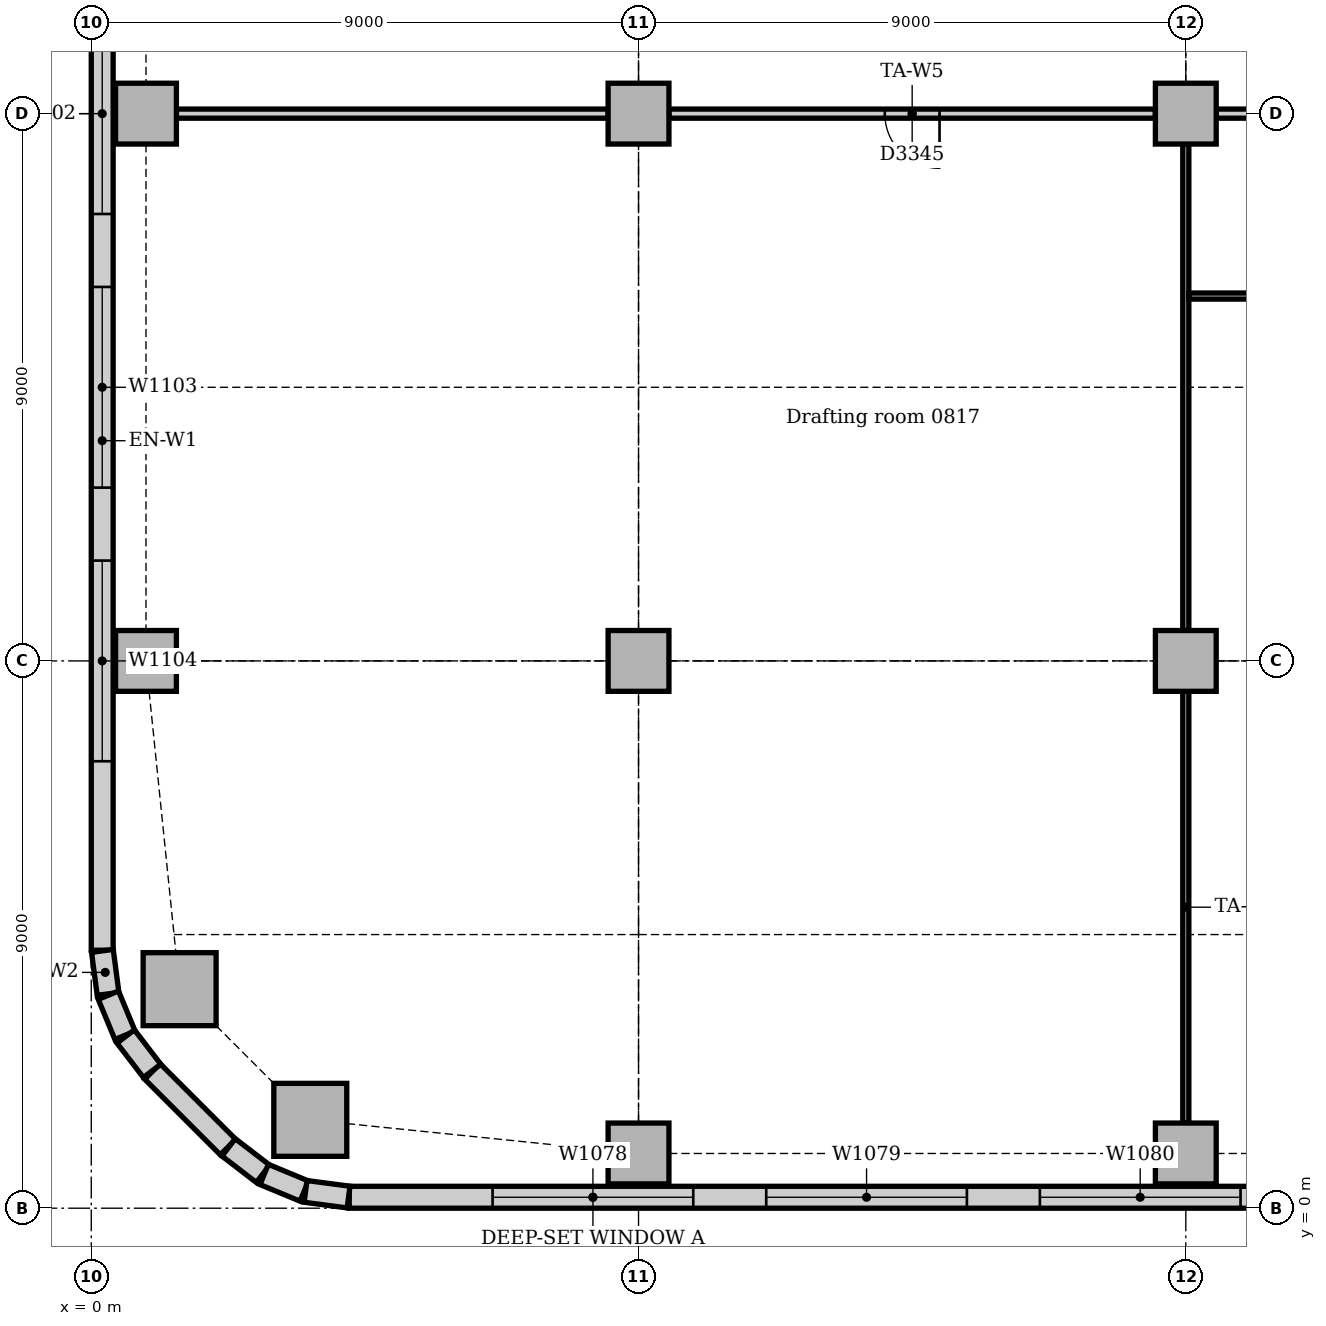
"""IFC4 building model, lengths in metres.
Left out: names, types, materials, properties, quantities, classifications, styles, units other than length and angle.
Written with IfcOpenShell. Run it as: python <this file> out.ifc"""

import sys

from ifc_helpers import new_model, si_unit, direction, frame, frame_2d, origin, origin_2d, place, context, subcontext, project, spatial, rectangle, extrude, element, fill, save


model = new_model("IFC4")
c1 = context("Model", 3, precision=1e-05, world=origin(), true_north=direction((0.0, 1.0)))
c2 = subcontext(c1, "Body", "Model", "MODEL_VIEW")
j1 = project(units=[si_unit("LENGTHUNIT", "METRE"), si_unit("PLANEANGLEUNIT", "RADIAN")], contexts=[c1])
p1 = place(None, origin())
s1 = spatial("IfcSite", under=j1, at=p1, CompositionType="ELEMENT")
p2 = place(p1, origin())
s2 = spatial("IfcBuilding", under=s1, at=p2, CompositionType="ELEMENT")
p3 = place(p2, frame((0.0, 0.0, 38.0)))
s3 = spatial("IfcBuildingStorey", under=s2, at=p3, CompositionType="ELEMENT", Elevation=38.0)
for number, where, z_axis, x_axis in (
    (1, (3.602, 1.453, 0.0), (0.0, 0.0, 1.0), (1.0, 0.0, 0.0)),
    (2, (1.453, 3.602, 0.0), (0.0, 0.0, 1.0), (1.0, 0.0, 0.0)),
):
    element("IfcColumn", number, at=place(p3, frame(where, z_axis=z_axis, x_axis=x_axis)), inside=s3, PredefinedType="COLUMN", context=c2, shape_type="SweptSolid", body=[
        extrude(rectangle(XDim=1.2, YDim=1.2, at=origin_2d()), origin(), (0.0, 0.0, 1.0), 3.85),
    ])
for number, where, z_axis, x_axis in (
    (3, (9.0, 0.9, 0.0), (0.0, 0.0, 1.0), (1.0, 0.0, 0.0)),
    (4, (18.0, 0.9, 0.0), (0.0, 0.0, 1.0), (1.0, 0.0, 0.0)),
    (5, (0.9, 9.0, 0.0), (0.0, 0.0, 1.0), (1.0, 0.0, 0.0)),
    (6, (0.9, 18.0, 0.0), (0.0, 0.0, 1.0), (1.0, 0.0, 0.0)),
    (7, (9.0, 9.0, 0.0), (0.0, 0.0, 1.0), (1.0, 0.0, 0.0)),
    (8, (9.0, 18.0, 0.0), (0.0, 0.0, 1.0), (1.0, 0.0, 0.0)),
    (9, (18.0, 9.0, 0.0), (0.0, 0.0, 1.0), (1.0, 0.0, 0.0)),
    (10, (18.0, 18.0, 0.0), (0.0, 0.0, 1.0), (1.0, 0.0, 0.0)),
):
    element("IfcColumn", number, at=place(p3, frame(where, z_axis=z_axis, x_axis=x_axis)), inside=s3, PredefinedType="COLUMN", context=c2, shape_type="SweptSolid", body=[
        extrude(rectangle(XDim=1.0, YDim=1.0, at=origin_2d()), origin(), (0.0, 0.0, 1.0), 3.85),
    ])
p4 = place(p3, frame((4.243, 0.18, 0.0), z_axis=(0.0, 0.0, 1.0), x_axis=(1.0, 0.0, 0.0)))
e11 = element("IfcWall", 11, at=p4, inside=s3, PredefinedType="STANDARD", context=c2, shape_type="SweptSolid", body=[
    extrude(rectangle(XDim=44.015, YDim=0.36, at=frame_2d((22.007, 0.0))), origin(), (0.0, 0.0, 1.0), 3.85),
])
p5 = place(p4, frame((2.357, 0.0, 0.9)))
e12 = element("IfcOpeningElement", 12, at=p5, cuts=e11, PredefinedType="OPENING", context=c2, shape_type="SweptSolid", body=[
    extrude(rectangle(XDim=3.3, YDim=1.6, at=frame_2d((1.65, 0.8))), frame((0.0, 0.19, 0.0), z_axis=(0.0, -1.0, 0.0), x_axis=(1.0, 0.0, 0.0)), (0.0, 0.0, 1.0), 0.38),
])
p6 = place(p4, frame((6.857, 0.0, 0.9)))
e13 = element("IfcOpeningElement", 13, at=p6, cuts=e11, PredefinedType="OPENING", context=c2, shape_type="SweptSolid", body=[
    extrude(rectangle(XDim=3.3, YDim=1.6, at=frame_2d((1.65, 0.8))), frame((0.0, 0.19, 0.0), z_axis=(0.0, -1.0, 0.0), x_axis=(1.0, 0.0, 0.0)), (0.0, 0.0, 1.0), 0.38),
])
p7 = place(p4, frame((11.357, 0.0, 0.9)))
e14 = element("IfcOpeningElement", 14, at=p7, cuts=e11, PredefinedType="OPENING", context=c2, shape_type="SweptSolid", body=[
    extrude(rectangle(XDim=3.3, YDim=1.6, at=frame_2d((1.65, 0.8))), frame((0.0, 0.19, 0.0), z_axis=(0.0, -1.0, 0.0), x_axis=(1.0, 0.0, 0.0)), (0.0, 0.0, 1.0), 0.38),
])
p8 = place(p4, frame((15.857, 0.0, 0.9)))
e15 = element("IfcOpeningElement", 15, at=p8, cuts=e11, PredefinedType="OPENING", context=c2, shape_type="SweptSolid", body=[
    extrude(rectangle(XDim=3.3, YDim=1.6, at=frame_2d((1.65, 0.8))), frame((0.0, 0.19, 0.0), z_axis=(0.0, -1.0, 0.0), x_axis=(1.0, 0.0, 0.0)), (0.0, 0.0, 1.0), 0.38),
])
p9 = place(p4, frame((20.357, 0.0, 0.9)))
e16 = element("IfcOpeningElement", 16, at=p9, cuts=e11, PredefinedType="OPENING", context=c2, shape_type="SweptSolid", body=[
    extrude(rectangle(XDim=3.3, YDim=1.6, at=frame_2d((1.65, 0.8))), frame((0.0, 0.19, 0.0), z_axis=(0.0, -1.0, 0.0), x_axis=(1.0, 0.0, 0.0)), (0.0, 0.0, 1.0), 0.38),
])
p10 = place(p4, frame((25.307, 0.0, 0.9)))
e17 = element("IfcOpeningElement", 17, at=p10, cuts=e11, PredefinedType="OPENING", context=c2, shape_type="SweptSolid", body=[
    extrude(rectangle(XDim=1.8, YDim=1.6, at=frame_2d((0.9, 0.8))), frame((0.0, 0.19, 0.0), z_axis=(0.0, -1.0, 0.0), x_axis=(1.0, 0.0, 0.0)), (0.0, 0.0, 1.0), 0.38),
])
p11 = place(p4, frame((29.357, 0.0, 0.9)))
e18 = element("IfcOpeningElement", 18, at=p11, cuts=e11, PredefinedType="OPENING", context=c2, shape_type="SweptSolid", body=[
    extrude(rectangle(XDim=3.3, YDim=1.6, at=frame_2d((1.65, 0.8))), frame((0.0, 0.19, 0.0), z_axis=(0.0, -1.0, 0.0), x_axis=(1.0, 0.0, 0.0)), (0.0, 0.0, 1.0), 0.38),
])
p12 = place(p4, frame((34.307, 0.0, 0.9)))
e19 = element("IfcOpeningElement", 19, at=p12, cuts=e11, PredefinedType="OPENING", context=c2, shape_type="SweptSolid", body=[
    extrude(rectangle(XDim=1.8, YDim=1.6, at=frame_2d((0.9, 0.8))), frame((0.0, 0.19, 0.0), z_axis=(0.0, -1.0, 0.0), x_axis=(1.0, 0.0, 0.0)), (0.0, 0.0, 1.0), 0.38),
])
p13 = place(p4, frame((38.357, 0.0, 0.9)))
e20 = element("IfcOpeningElement", 20, at=p13, cuts=e11, PredefinedType="OPENING", context=c2, shape_type="SweptSolid", body=[
    extrude(rectangle(XDim=3.3, YDim=1.6, at=frame_2d((1.65, 0.8))), frame((0.0, 0.19, 0.0), z_axis=(0.0, -1.0, 0.0), x_axis=(1.0, 0.0, 0.0)), (0.0, 0.0, 1.0), 0.38),
])
p14 = place(p3, frame((0.18, 21.0, 0.0), z_axis=(0.0, 0.0, 1.0), x_axis=(0.0, -1.0, 0.0)))
e21 = element("IfcWall", 21, at=p14, inside=s3, PredefinedType="STANDARD", context=c2, shape_type="SweptSolid", body=[
    extrude(rectangle(XDim=16.757, YDim=0.36, at=frame_2d((8.379, 0.0))), origin(), (0.0, 0.0, 1.0), 3.85),
])
p15 = place(p14, frame((1.35, 0.0, 0.9)))
e22 = element("IfcOpeningElement", 22, at=p15, cuts=e21, PredefinedType="OPENING", context=c2, shape_type="SweptSolid", body=[
    extrude(rectangle(XDim=3.3, YDim=1.6, at=frame_2d((1.65, 0.8))), frame((0.0, 0.19, 0.0), z_axis=(0.0, -1.0, 0.0), x_axis=(1.0, 0.0, 0.0)), (0.0, 0.0, 1.0), 0.38),
])
p16 = place(p14, frame((5.85, 0.0, 0.9)))
e23 = element("IfcOpeningElement", 23, at=p16, cuts=e21, PredefinedType="OPENING", context=c2, shape_type="SweptSolid", body=[
    extrude(rectangle(XDim=3.3, YDim=1.6, at=frame_2d((1.65, 0.8))), frame((0.0, 0.19, 0.0), z_axis=(0.0, -1.0, 0.0), x_axis=(1.0, 0.0, 0.0)), (0.0, 0.0, 1.0), 0.38),
])
p17 = place(p14, frame((10.35, 0.0, 0.9)))
e24 = element("IfcOpeningElement", 24, at=p17, cuts=e21, PredefinedType="OPENING", context=c2, shape_type="SweptSolid", body=[
    extrude(rectangle(XDim=3.3, YDim=1.6, at=frame_2d((1.65, 0.8))), frame((0.0, 0.19, 0.0), z_axis=(0.0, -1.0, 0.0), x_axis=(1.0, 0.0, 0.0)), (0.0, 0.0, 1.0), 0.38),
])
p18 = place(p3, frame((1.006, 2.249, 0.0), z_axis=(0.0, 0.0, 1.0), x_axis=(0.707106781187, -0.707106781187, 0.0)))
e25 = element("IfcWall", 25, at=p18, inside=s3, PredefinedType="STANDARD", context=c2, shape_type="SweptSolid", body=[
    extrude(rectangle(XDim=1.757, YDim=0.36, at=frame_2d((0.879, 0.0))), origin(), (0.0, 0.0, 1.0), 3.85),
])
for number, where, z_axis, x_axis in (
    (26, (0.183, 4.231, 0.0), (0.0, 0.0, 1.0), (0.131, -0.991, 0.0)),
    (27, (0.282, 3.503, 0.0), (0.0, 0.0, 1.0), (0.383, -0.924, 0.0)),
):
    element("IfcWall", number, at=place(p3, frame(where, z_axis=z_axis, x_axis=x_axis)), inside=s3, PredefinedType="STANDARD", context=c2, shape_type="SweptSolid", body=[
        extrude(rectangle(XDim=0.713, YDim=0.36, at=frame_2d((0.356, 0.0))), origin(), (0.0, 0.0, 1.0), 3.85),
    ])
for number, where, z_axis, x_axis in (
    (28, (0.566, 2.825, 0.0), (0.0, 0.0, 1.0), (0.609, -0.793, 0.0)),
    (29, (2.259, 1.0, 0.0), (0.0, 0.0, 1.0), (0.793, -0.609, 0.0)),
):
    element("IfcWall", number, at=place(p3, frame(where, z_axis=z_axis, x_axis=x_axis)), inside=s3, PredefinedType="STANDARD", context=c2, shape_type="SweptSolid", body=[
        extrude(rectangle(XDim=0.713, YDim=0.36, at=frame_2d((0.357, 0.0))), origin(), (0.0, 0.0, 1.0), 3.85),
    ])
for number, where, z_axis, x_axis in (
    (30, (2.844, 0.555, 0.0), (0.0, 0.0, 1.0), (0.924, -0.383, 0.0)),
    (31, (3.524, 0.276, 0.0), (0.0, 0.0, 1.0), (0.991, -0.131, 0.0)),
):
    element("IfcWall", number, at=place(p3, frame(where, z_axis=z_axis, x_axis=x_axis)), inside=s3, PredefinedType="STANDARD", context=c2, shape_type="SweptSolid", body=[
        extrude(rectangle(XDim=0.713, YDim=0.36, at=frame_2d((0.356, 0.0))), origin(), (0.0, 0.0, 1.0), 3.85),
    ])
p19 = place(p3, frame((18.5, 18.0, 0.0), z_axis=(0.0, 0.0, 1.0), x_axis=(1.0, 0.0, 0.0)))
e32 = element("IfcWall", 32, at=p19, inside=s3, PredefinedType="PARTITIONING", context=c2, shape_type="SweptSolid", body=[
    extrude(rectangle(XDim=8.0, YDim=0.15, at=frame_2d((4.0, 0.0))), origin(), (0.0, 0.0, 1.0), 3.15),
])
p20 = place(p19, frame((3.5, 0.0, 0.0)))
e33 = element("IfcOpeningElement", 33, at=p20, cuts=e32, PredefinedType="OPENING", context=c2, shape_type="SweptSolid", body=[
    extrude(rectangle(XDim=1.0, YDim=2.1, at=frame_2d((0.5, 1.05))), frame((0.0, 0.085, 0.0), z_axis=(0.0, -1.0, 0.0), x_axis=(1.0, 0.0, 0.0)), (0.0, 0.0, 1.0), 0.17),
])
p21 = place(p3, frame((9.5, 18.0, 0.0), z_axis=(0.0, 0.0, 1.0), x_axis=(1.0, 0.0, 0.0)))
e34 = element("IfcWall", 34, at=p21, inside=s3, PredefinedType="PARTITIONING", context=c2, shape_type="SweptSolid", body=[
    extrude(rectangle(XDim=8.0, YDim=0.15, at=frame_2d((4.0, 0.0))), origin(), (0.0, 0.0, 1.0), 3.15),
])
p22 = place(p21, frame((3.55, 0.0, 0.0)))
e35 = element("IfcOpeningElement", 35, at=p22, cuts=e34, PredefinedType="OPENING", context=c2, shape_type="SweptSolid", body=[
    extrude(rectangle(XDim=0.9, YDim=2.1, at=frame_2d((0.45, 1.05))), frame((0.0, 0.085, 0.0), z_axis=(0.0, -1.0, 0.0), x_axis=(1.0, 0.0, 0.0)), (0.0, 0.0, 1.0), 0.17),
])
p23 = place(p3, frame((1.4, 18.0, 0.0), z_axis=(0.0, 0.0, 1.0), x_axis=(1.0, 0.0, 0.0)))
e36 = element("IfcWall", 36, at=p23, inside=s3, PredefinedType="PARTITIONING", context=c2, shape_type="SweptSolid", body=[
    extrude(rectangle(XDim=7.1, YDim=0.15, at=frame_2d((3.55, 0.0))), origin(), (0.0, 0.0, 1.0), 3.15),
])
p24 = place(p3, frame((18.0, 1.4, 0.0), z_axis=(0.0, 0.0, 1.0), x_axis=(0.0, 1.0, 0.0)))
e37 = element("IfcWall", 37, at=p24, inside=s3, PredefinedType="PARTITIONING", context=c2, shape_type="SweptSolid", body=[
    extrude(rectangle(XDim=7.1, YDim=0.1, at=frame_2d((3.55, 0.0))), origin(), (0.0, 0.0, 1.0), 3.158),
])
p25 = place(p3, frame((18.0, 9.5, 0.0), z_axis=(0.0, 0.0, 1.0), x_axis=(0.0, 1.0, 0.0)))
e38 = element("IfcWall", 38, at=p25, inside=s3, PredefinedType="PARTITIONING", context=c2, shape_type="SweptSolid", body=[
    extrude(rectangle(XDim=8.0, YDim=0.1, at=frame_2d((4.0, 0.0))), origin(), (0.0, 0.0, 1.0), 3.158),
])
p26 = place(p3, frame((18.05, 15.0, 0.0), z_axis=(0.0, 0.0, 1.0), x_axis=(1.0, 0.0, 0.0)))
e39 = element("IfcWall", 39, at=p26, inside=s3, PredefinedType="PARTITIONING", context=c2, shape_type="SweptSolid", body=[
    extrude(rectangle(XDim=13.4, YDim=0.1, at=frame_2d((6.7, 0.0))), origin(), (0.0, 0.0, 1.0), 3.85),
])
p27 = place(p26, frame((6.25, 0.0, 0.0)))
e40 = element("IfcOpeningElement", 40, at=p27, cuts=e39, PredefinedType="OPENING", context=c2, shape_type="SweptSolid", body=[
    extrude(rectangle(XDim=0.9, YDim=2.1, at=frame_2d((0.45, 1.05))), frame((0.0, 0.06, 0.0), z_axis=(0.0, -1.0, 0.0), x_axis=(1.0, 0.0, 0.0)), (0.0, 0.0, 1.0), 0.12),
])
p28 = place(p5, origin())
e41 = element("IfcWindow", 41, at=p28, inside=s3, PartitioningType="SINGLE_PANEL", PredefinedType="WINDOW", context=c2, shape_type="SweptSolid", body=[
    extrude(rectangle(XDim=3.3, YDim=1.6, at=frame_2d((1.65, 0.8))), frame((0.0, 0.13, 0.0), z_axis=(0.0, -1.0, 0.0), x_axis=(1.0, 0.0, 0.0)), (0.0, 0.0, 1.0), 0.06),
])
fill(e12, e41)
p29 = place(p6, origin())
e42 = element("IfcWindow", 42, at=p29, inside=s3, PartitioningType="SINGLE_PANEL", PredefinedType="WINDOW", context=c2, shape_type="SweptSolid", body=[
    extrude(rectangle(XDim=3.3, YDim=1.6, at=frame_2d((1.65, 0.8))), frame((0.0, 0.13, 0.0), z_axis=(0.0, -1.0, 0.0), x_axis=(1.0, 0.0, 0.0)), (0.0, 0.0, 1.0), 0.06),
])
fill(e13, e42)
p30 = place(p7, origin())
e43 = element("IfcWindow", 43, at=p30, inside=s3, PartitioningType="SINGLE_PANEL", PredefinedType="WINDOW", context=c2, shape_type="SweptSolid", body=[
    extrude(rectangle(XDim=3.3, YDim=1.6, at=frame_2d((1.65, 0.8))), frame((0.0, 0.13, 0.0), z_axis=(0.0, -1.0, 0.0), x_axis=(1.0, 0.0, 0.0)), (0.0, 0.0, 1.0), 0.06),
])
fill(e14, e43)
p31 = place(p15, origin())
e44 = element("IfcWindow", 44, at=p31, inside=s3, PartitioningType="SINGLE_PANEL", PredefinedType="WINDOW", context=c2, shape_type="SweptSolid", body=[
    extrude(rectangle(XDim=3.3, YDim=1.6, at=frame_2d((1.65, 0.8))), frame((0.0, 0.13, 0.0), z_axis=(0.0, -1.0, 0.0), x_axis=(1.0, 0.0, 0.0)), (0.0, 0.0, 1.0), 0.06),
])
fill(e22, e44)
p32 = place(p16, origin())
e45 = element("IfcWindow", 45, at=p32, inside=s3, PartitioningType="SINGLE_PANEL", PredefinedType="WINDOW", context=c2, shape_type="SweptSolid", body=[
    extrude(rectangle(XDim=3.3, YDim=1.6, at=frame_2d((1.65, 0.8))), frame((0.0, 0.13, 0.0), z_axis=(0.0, -1.0, 0.0), x_axis=(1.0, 0.0, 0.0)), (0.0, 0.0, 1.0), 0.06),
])
fill(e23, e45)
p33 = place(p17, origin())
e46 = element("IfcWindow", 46, at=p33, inside=s3, PartitioningType="SINGLE_PANEL", PredefinedType="WINDOW", context=c2, shape_type="SweptSolid", body=[
    extrude(rectangle(XDim=3.3, YDim=1.6, at=frame_2d((1.65, 0.8))), frame((0.0, 0.13, 0.0), z_axis=(0.0, -1.0, 0.0), x_axis=(1.0, 0.0, 0.0)), (0.0, 0.0, 1.0), 0.06),
])
fill(e24, e46)
p34 = place(p22, frame((0.9, 0.0, 0.0), z_axis=(0.0, 0.0, 1.0), x_axis=(-1.0, 0.0, 0.0)))
e47 = element("IfcDoor", 47, at=p34, inside=s3, OperationType="SINGLE_SWING_LEFT", PredefinedType="DOOR", context=c2, shape_type="SweptSolid", body=[
    extrude(rectangle(XDim=0.9, YDim=2.1, at=frame_2d((0.45, 1.05))), frame((0.0, 0.025, 0.0), z_axis=(0.0, -1.0, 0.0), x_axis=(1.0, 0.0, 0.0)), (0.0, 0.0, 1.0), 0.05),
])
fill(e35, e47)
save(model, sys.argv[1])
